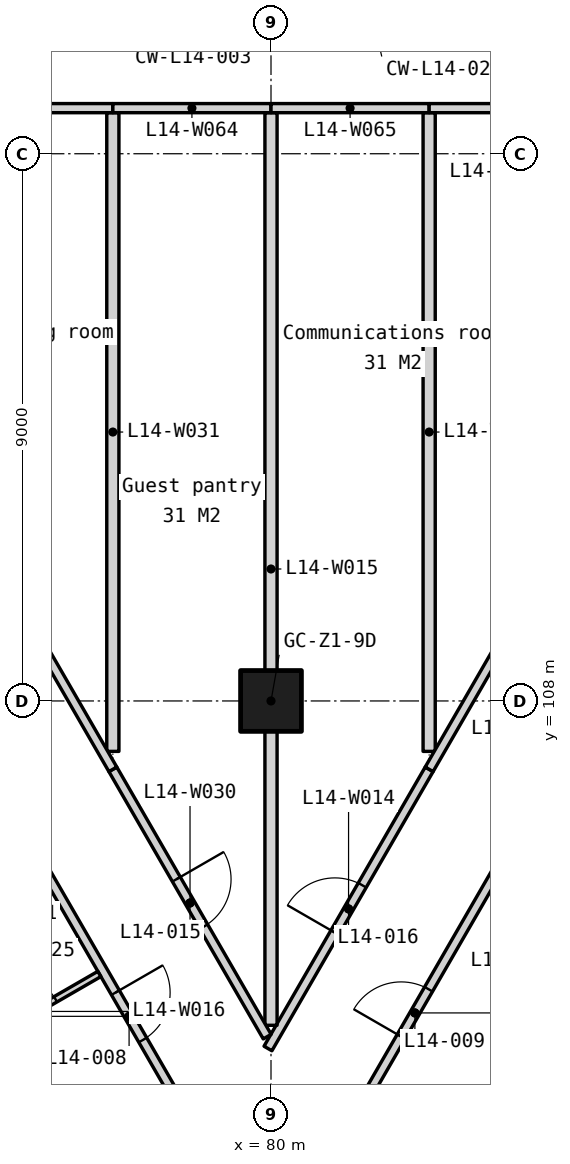
"""IFC4 building model, lengths in metres.
Left out: names, types, materials, properties, quantities, classifications, styles, units other than length and angle.
Written with IfcOpenShell. Run it as: python <this file> out.ifc"""

import sys

from ifc_helpers import new_model, si_unit, direction, frame, frame_2d, origin, origin_2d, place, context, subcontext, project, spatial, polyline, rectangle, outline, extrude, element, fill, save


model = new_model("IFC4")
c1 = context("Model", 3, precision=1e-05, world=origin(), true_north=direction((0.0, 1.0)))
c2 = subcontext(c1, "Body", "Model", "MODEL_VIEW")
j1 = project(units=[si_unit("LENGTHUNIT", "METRE"), si_unit("PLANEANGLEUNIT", "RADIAN")], contexts=[c1])
p1 = place(None, origin())
s1 = spatial("IfcSite", under=j1, at=p1, CompositionType="ELEMENT")
p2 = place(p1, origin())
s2 = spatial("IfcBuilding", under=s1, at=p2, CompositionType="ELEMENT")
p3 = place(p2, frame((0.0, 0.0, 63.0)))
s3 = spatial("IfcBuildingStorey", under=s2, at=p3, CompositionType="ELEMENT", Elevation=63.0)
p4 = place(p3, frame((80.0, 108.0, 0.0), z_axis=(0.0, 0.0, 1.0), x_axis=(1.0, 0.0, 0.0)))
e1 = element("IfcColumn", 1, at=p4, inside=s3, PredefinedType="COLUMN", context=c2, shape_type="SweptSolid", body=[
    extrude(rectangle(XDim=1.0, YDim=1.0, at=origin_2d()), origin(), (0.0, 0.0, 1.0), 3.5),
])
p5 = place(p3, frame((54.495, 129.397, -0.15), z_axis=(0.0, 0.0, 1.0), x_axis=(0.499999201451, -0.866025864826, 0.0)))
e2 = element("IfcWall", 2, at=p5, inside=s3, PredefinedType="SOLIDWALL", context=c2, shape_type="SweptSolid", body=[
    extrude(outline(polyline([(44.8, 0.0), (44.8, 3.5), (0.0, 3.5), (0.0, 0.0), (44.8, 0.0)])), frame((0.0, 0.225, 0.0), z_axis=(0.0, -1.0, 0.0), x_axis=(1.0, 0.0, 0.0)), (0.0, 0.0, 1.0), 0.45),
])
p6 = place(p5, frame((2.43, 0.0, 1.05)))
e3 = element("IfcOpeningElement", 3, at=p6, cuts=e2, PredefinedType="OPENING", context=c2, shape_type="SweptSolid", body=[
    extrude(rectangle(XDim=1.8, YDim=1.5, at=frame_2d((0.9, 0.75))), frame((0.0, 0.235, 0.0), z_axis=(0.0, -1.0, 0.0), x_axis=(1.0, 0.0, 0.0)), (0.0, 0.0, 1.0), 0.47),
])
p7 = place(p5, frame((4.73, 0.0, 1.05)))
e4 = element("IfcOpeningElement", 4, at=p7, cuts=e2, PredefinedType="OPENING", context=c2, shape_type="SweptSolid", body=[
    extrude(rectangle(XDim=1.8, YDim=1.5, at=frame_2d((0.9, 0.75))), frame((0.0, 0.235, 0.0), z_axis=(0.0, -1.0, 0.0), x_axis=(1.0, 0.0, 0.0)), (0.0, 0.0, 1.0), 0.47),
])
p8 = place(p5, frame((11.39, 0.0, 1.05)))
e5 = element("IfcOpeningElement", 5, at=p8, cuts=e2, PredefinedType="OPENING", context=c2, shape_type="SweptSolid", body=[
    extrude(rectangle(XDim=1.8, YDim=1.5, at=frame_2d((0.9, 0.75))), frame((0.0, 0.235, 0.0), z_axis=(0.0, -1.0, 0.0), x_axis=(1.0, 0.0, 0.0)), (0.0, 0.0, 1.0), 0.47),
])
p9 = place(p5, frame((13.69, 0.0, 1.05)))
e6 = element("IfcOpeningElement", 6, at=p9, cuts=e2, PredefinedType="OPENING", context=c2, shape_type="SweptSolid", body=[
    extrude(rectangle(XDim=1.8, YDim=1.5, at=frame_2d((0.9, 0.75))), frame((0.0, 0.235, 0.0), z_axis=(0.0, -1.0, 0.0), x_axis=(1.0, 0.0, 0.0)), (0.0, 0.0, 1.0), 0.47),
])
p10 = place(p5, frame((20.35, 0.0, 1.05)))
e7 = element("IfcOpeningElement", 7, at=p10, cuts=e2, PredefinedType="OPENING", context=c2, shape_type="SweptSolid", body=[
    extrude(rectangle(XDim=1.8, YDim=1.5, at=frame_2d((0.9, 0.75))), frame((0.0, 0.235, 0.0), z_axis=(0.0, -1.0, 0.0), x_axis=(1.0, 0.0, 0.0)), (0.0, 0.0, 1.0), 0.47),
])
p11 = place(p5, frame((22.65, 0.0, 1.05)))
e8 = element("IfcOpeningElement", 8, at=p11, cuts=e2, PredefinedType="OPENING", context=c2, shape_type="SweptSolid", body=[
    extrude(rectangle(XDim=1.8, YDim=1.5, at=frame_2d((0.9, 0.75))), frame((0.0, 0.235, 0.0), z_axis=(0.0, -1.0, 0.0), x_axis=(1.0, 0.0, 0.0)), (0.0, 0.0, 1.0), 0.47),
])
p12 = place(p5, frame((29.31, 0.0, 1.05)))
e9 = element("IfcOpeningElement", 9, at=p12, cuts=e2, PredefinedType="OPENING", context=c2, shape_type="SweptSolid", body=[
    extrude(rectangle(XDim=1.8, YDim=1.5, at=frame_2d((0.9, 0.75))), frame((0.0, 0.235, 0.0), z_axis=(0.0, -1.0, 0.0), x_axis=(1.0, 0.0, 0.0)), (0.0, 0.0, 1.0), 0.47),
])
p13 = place(p5, frame((31.61, 0.0, 1.05)))
e10 = element("IfcOpeningElement", 10, at=p13, cuts=e2, PredefinedType="OPENING", context=c2, shape_type="SweptSolid", body=[
    extrude(rectangle(XDim=1.8, YDim=1.5, at=frame_2d((0.9, 0.75))), frame((0.0, 0.235, 0.0), z_axis=(0.0, -1.0, 0.0), x_axis=(1.0, 0.0, 0.0)), (0.0, 0.0, 1.0), 0.47),
])
p14 = place(p5, frame((38.27, 0.0, 1.05)))
e11 = element("IfcOpeningElement", 11, at=p14, cuts=e2, PredefinedType="OPENING", context=c2, shape_type="SweptSolid", body=[
    extrude(rectangle(XDim=1.8, YDim=1.5, at=frame_2d((0.9, 0.75))), frame((0.0, 0.235, 0.0), z_axis=(0.0, -1.0, 0.0), x_axis=(1.0, 0.0, 0.0)), (0.0, 0.0, 1.0), 0.47),
])
p15 = place(p5, frame((40.57, 0.0, 1.05)))
e12 = element("IfcOpeningElement", 12, at=p15, cuts=e2, PredefinedType="OPENING", context=c2, shape_type="SweptSolid", body=[
    extrude(rectangle(XDim=1.8, YDim=1.5, at=frame_2d((0.9, 0.75))), frame((0.0, 0.235, 0.0), z_axis=(0.0, -1.0, 0.0), x_axis=(1.0, 0.0, 0.0)), (0.0, 0.0, 1.0), 0.47),
])
p16 = place(p3, frame((83.105, 90.599, -0.15), z_axis=(0.0, 0.0, 1.0), x_axis=(0.499999201451, 0.866025864826, 0.0)))
e13 = element("IfcWall", 13, at=p16, inside=s3, PredefinedType="SOLIDWALL", context=c2, shape_type="SweptSolid", body=[
    extrude(outline(polyline([(44.8, 0.0), (44.8, 3.5), (0.0, 3.5), (0.0, 0.0), (44.8, 0.0)])), frame((0.0, 0.225, 0.0), z_axis=(0.0, -1.0, 0.0), x_axis=(1.0, 0.0, 0.0)), (0.0, 0.0, 1.0), 0.45),
])
p17 = place(p16, frame((2.43, 0.0, 1.05)))
e14 = element("IfcOpeningElement", 14, at=p17, cuts=e13, PredefinedType="OPENING", context=c2, shape_type="SweptSolid", body=[
    extrude(rectangle(XDim=1.8, YDim=1.5, at=frame_2d((0.9, 0.75))), frame((0.0, 0.235, 0.0), z_axis=(0.0, -1.0, 0.0), x_axis=(1.0, 0.0, 0.0)), (0.0, 0.0, 1.0), 0.47),
])
p18 = place(p16, frame((4.73, 0.0, 1.05)))
e15 = element("IfcOpeningElement", 15, at=p18, cuts=e13, PredefinedType="OPENING", context=c2, shape_type="SweptSolid", body=[
    extrude(rectangle(XDim=1.8, YDim=1.5, at=frame_2d((0.9, 0.75))), frame((0.0, 0.235, 0.0), z_axis=(0.0, -1.0, 0.0), x_axis=(1.0, 0.0, 0.0)), (0.0, 0.0, 1.0), 0.47),
])
p19 = place(p16, frame((11.39, 0.0, 1.05)))
e16 = element("IfcOpeningElement", 16, at=p19, cuts=e13, PredefinedType="OPENING", context=c2, shape_type="SweptSolid", body=[
    extrude(rectangle(XDim=1.8, YDim=1.5, at=frame_2d((0.9, 0.75))), frame((0.0, 0.235, 0.0), z_axis=(0.0, -1.0, 0.0), x_axis=(1.0, 0.0, 0.0)), (0.0, 0.0, 1.0), 0.47),
])
p20 = place(p16, frame((13.69, 0.0, 1.05)))
e17 = element("IfcOpeningElement", 17, at=p20, cuts=e13, PredefinedType="OPENING", context=c2, shape_type="SweptSolid", body=[
    extrude(rectangle(XDim=1.8, YDim=1.5, at=frame_2d((0.9, 0.75))), frame((0.0, 0.235, 0.0), z_axis=(0.0, -1.0, 0.0), x_axis=(1.0, 0.0, 0.0)), (0.0, 0.0, 1.0), 0.47),
])
p21 = place(p16, frame((20.35, 0.0, 1.05)))
e18 = element("IfcOpeningElement", 18, at=p21, cuts=e13, PredefinedType="OPENING", context=c2, shape_type="SweptSolid", body=[
    extrude(rectangle(XDim=1.8, YDim=1.5, at=frame_2d((0.9, 0.75))), frame((0.0, 0.235, 0.0), z_axis=(0.0, -1.0, 0.0), x_axis=(1.0, 0.0, 0.0)), (0.0, 0.0, 1.0), 0.47),
])
p22 = place(p16, frame((22.65, 0.0, 1.05)))
e19 = element("IfcOpeningElement", 19, at=p22, cuts=e13, PredefinedType="OPENING", context=c2, shape_type="SweptSolid", body=[
    extrude(rectangle(XDim=1.8, YDim=1.5, at=frame_2d((0.9, 0.75))), frame((0.0, 0.235, 0.0), z_axis=(0.0, -1.0, 0.0), x_axis=(1.0, 0.0, 0.0)), (0.0, 0.0, 1.0), 0.47),
])
p23 = place(p16, frame((29.31, 0.0, 1.05)))
e20 = element("IfcOpeningElement", 20, at=p23, cuts=e13, PredefinedType="OPENING", context=c2, shape_type="SweptSolid", body=[
    extrude(rectangle(XDim=1.8, YDim=1.5, at=frame_2d((0.9, 0.75))), frame((0.0, 0.235, 0.0), z_axis=(0.0, -1.0, 0.0), x_axis=(1.0, 0.0, 0.0)), (0.0, 0.0, 1.0), 0.47),
])
p24 = place(p16, frame((31.61, 0.0, 1.05)))
e21 = element("IfcOpeningElement", 21, at=p24, cuts=e13, PredefinedType="OPENING", context=c2, shape_type="SweptSolid", body=[
    extrude(rectangle(XDim=1.8, YDim=1.5, at=frame_2d((0.9, 0.75))), frame((0.0, 0.235, 0.0), z_axis=(0.0, -1.0, 0.0), x_axis=(1.0, 0.0, 0.0)), (0.0, 0.0, 1.0), 0.47),
])
p25 = place(p16, frame((38.27, 0.0, 1.05)))
e22 = element("IfcOpeningElement", 22, at=p25, cuts=e13, PredefinedType="OPENING", context=c2, shape_type="SweptSolid", body=[
    extrude(rectangle(XDim=1.8, YDim=1.5, at=frame_2d((0.9, 0.75))), frame((0.0, 0.235, 0.0), z_axis=(0.0, -1.0, 0.0), x_axis=(1.0, 0.0, 0.0)), (0.0, 0.0, 1.0), 0.47),
])
p26 = place(p16, frame((40.57, 0.0, 1.05)))
e23 = element("IfcOpeningElement", 23, at=p26, cuts=e13, PredefinedType="OPENING", context=c2, shape_type="SweptSolid", body=[
    extrude(rectangle(XDim=1.8, YDim=1.5, at=frame_2d((0.9, 0.75))), frame((0.0, 0.235, 0.0), z_axis=(0.0, -1.0, 0.0), x_axis=(1.0, 0.0, 0.0)), (0.0, 0.0, 1.0), 0.47),
])
p27 = place(p3, frame((76.042, 105.626, 0.0), z_axis=(0.0, 0.0, 1.0), x_axis=(0.499991405182, -0.866030365948, 0.0)))
e24 = element("IfcWall", 24, at=p27, inside=s3, PredefinedType="PARTITIONING", context=c2, shape_type="SweptSolid", body=[
    extrude(rectangle(XDim=6.496, YDim=0.15, at=frame_2d((3.248, 0.0))), origin(), (0.0, 0.0, 1.0), 3.35),
])
p28 = place(p27, frame((2.798, 0.0, 0.0)))
e25 = element("IfcOpeningElement", 25, at=p28, cuts=e24, PredefinedType="OPENING", context=c2, shape_type="SweptSolid", body=[
    extrude(rectangle(XDim=0.9, YDim=2.1, at=frame_2d((0.45, 1.05))), frame((0.0, 0.085, 0.0), z_axis=(0.0, -1.0, 0.0), x_axis=(1.0, 0.0, 0.0)), (0.0, 0.0, 1.0), 0.17),
])
p29 = place(p3, frame((79.95, 102.284, 0.0), z_axis=(0.0, 0.0, 1.0), x_axis=(0.500026712466, 0.866009980786, 0.0)))
e26 = element("IfcWall", 26, at=p29, inside=s3, PredefinedType="PARTITIONING", context=c2, shape_type="SweptSolid", body=[
    extrude(rectangle(XDim=5.302, YDim=0.15, at=frame_2d((2.651, 0.0))), origin(), (0.0, 0.0, 1.0), 3.35),
])
p30 = place(p29, frame((2.201, 0.0, 0.0)))
e27 = element("IfcOpeningElement", 27, at=p30, cuts=e26, PredefinedType="OPENING", context=c2, shape_type="SweptSolid", body=[
    extrude(rectangle(XDim=0.9, YDim=2.1, at=frame_2d((0.45, 1.05))), frame((0.0, 0.085, 0.0), z_axis=(0.0, -1.0, 0.0), x_axis=(1.0, 0.0, 0.0)), (0.0, 0.0, 1.0), 0.17),
])
p31 = place(p3, frame((80.0, 102.666, 0.0), z_axis=(0.0, 0.0, 1.0), x_axis=(0.0, 1.0, 0.0)))
e28 = element("IfcWall", 28, at=p31, inside=s3, PredefinedType="PARTITIONING", context=c2, shape_type="SweptSolid", body=[
    extrude(rectangle(XDim=15.01, YDim=0.2, at=frame_2d((7.505, 0.0))), origin(), (0.0, 0.0, 1.0), 2.801),
])
p32 = place(p3, frame((75.042, 102.277, 0.0), z_axis=(0.0, 0.0, 1.0), x_axis=(0.865997559407, 0.500048224776, 0.0)))
e29 = element("IfcWall", 29, at=p32, inside=s3, PredefinedType="PARTITIONING", context=c2, shape_type="SweptSolid", body=[
    extrude(rectangle(XDim=2.465, YDim=0.1, at=frame_2d((1.232, 0.0))), origin(), (0.0, 0.0, 1.0), 3.35),
])
p33 = place(p32, frame((0.833, 0.0, 0.0)))
e30 = element("IfcOpeningElement", 30, at=p33, cuts=e29, PredefinedType="OPENING", context=c2, shape_type="SweptSolid", body=[
    extrude(rectangle(XDim=0.8, YDim=2.1, at=frame_2d((0.4, 1.05))), frame((0.0, 0.06, 0.0), z_axis=(0.0, -1.0, 0.0), x_axis=(1.0, 0.0, 0.0)), (0.0, 0.0, 1.0), 0.12),
])
p34 = place(p3, frame((80.775, 100.113, 0.0), z_axis=(0.0, 0.0, 1.0), x_axis=(0.5000079448, 0.866020816803, 0.0)))
e31 = element("IfcWall", 31, at=p34, inside=s3, PredefinedType="PARTITIONING", context=c2, shape_type="SweptSolid", body=[
    extrude(rectangle(XDim=6.366, YDim=0.15, at=frame_2d((3.183, 0.0))), origin(), (0.0, 0.0, 1.0), 3.35),
])
p35 = place(p34, frame((2.733, 0.0, 0.0)))
e32 = element("IfcOpeningElement", 32, at=p35, cuts=e31, PredefinedType="OPENING", context=c2, shape_type="SweptSolid", body=[
    extrude(rectangle(XDim=0.9, YDim=2.1, at=frame_2d((0.45, 1.05))), frame((0.0, 0.085, 0.0), z_axis=(0.0, -1.0, 0.0), x_axis=(1.0, 0.0, 0.0)), (0.0, 0.0, 1.0), 0.17),
])
p36 = place(p3, frame((77.399, 106.875, 0.0), z_axis=(0.0, 0.0, 1.0), x_axis=(0.500017996867, -0.866015013039, 0.0)))
e33 = element("IfcWall", 33, at=p36, inside=s3, PredefinedType="PARTITIONING", context=c2, shape_type="SweptSolid", body=[
    extrude(rectangle(XDim=5.077, YDim=0.15, at=frame_2d((2.539, 0.0))), origin(), (0.0, 0.0, 1.0), 3.35),
])
p37 = place(p36, frame((2.088, 0.0, 0.0)))
e34 = element("IfcOpeningElement", 34, at=p37, cuts=e33, PredefinedType="OPENING", context=c2, shape_type="SweptSolid", body=[
    extrude(rectangle(XDim=0.9, YDim=2.1, at=frame_2d((0.45, 1.05))), frame((0.0, 0.085, 0.0), z_axis=(0.0, -1.0, 0.0), x_axis=(1.0, 0.0, 0.0)), (0.0, 0.0, 1.0), 0.17),
])
for number, where, z_axis, x_axis in (
    (35, (77.399, 107.171, 0.0), (0.0, 0.0, 1.0), (0.0, 1.0, 0.0)),
    (36, (82.601, 107.171, 0.0), (0.0, 0.0, 1.0), (0.0, 1.0, 0.0)),
):
    element("IfcWall", number, at=place(p3, frame(where, z_axis=z_axis, x_axis=x_axis)), inside=s3, PredefinedType="PARTITIONING", context=c2, shape_type="SweptSolid", body=[
        extrude(rectangle(XDim=10.504, YDim=0.2, at=frame_2d((5.252, 0.0))), origin(), (0.0, 0.0, 1.0), 3.35),
    ])
p38 = place(p3, frame((82.601, 106.875, 0.0), z_axis=(0.0, 0.0, 1.0), x_axis=(0.499995104884, 0.866028229963, 0.0)))
e37 = element("IfcWall", 37, at=p38, inside=s3, PredefinedType="PARTITIONING", context=c2, shape_type="SweptSolid", body=[
    extrude(rectangle(XDim=12.557, YDim=0.15, at=frame_2d((6.278, 0.0))), origin(), (0.0, 0.0, 1.0), 3.35),
])
p39 = place(p38, frame((5.828, 0.0, 0.0)))
e38 = element("IfcOpeningElement", 38, at=p39, cuts=e37, PredefinedType="OPENING", context=c2, shape_type="SweptSolid", body=[
    extrude(rectangle(XDim=0.9, YDim=2.1, at=frame_2d((0.45, 1.05))), frame((0.0, 0.085, 0.0), z_axis=(0.0, -1.0, 0.0), x_axis=(1.0, 0.0, 0.0)), (0.0, 0.0, 1.0), 0.17),
])
p40 = place(p3, frame((71.121, 117.75, 0.0), z_axis=(0.0, 0.0, 1.0), x_axis=(0.499995104884, -0.866028229963, 0.0)))
e39 = element("IfcWall", 39, at=p40, inside=s3, PredefinedType="PARTITIONING", context=c2, shape_type="SweptSolid", body=[
    extrude(rectangle(XDim=12.557, YDim=0.15, at=frame_2d((6.278, 0.0))), origin(), (0.0, 0.0, 1.0), 3.35),
])
p41 = place(p40, frame((5.828, 0.0, 0.0)))
e40 = element("IfcOpeningElement", 40, at=p41, cuts=e39, PredefinedType="OPENING", context=c2, shape_type="SweptSolid", body=[
    extrude(rectangle(XDim=0.9, YDim=2.1, at=frame_2d((0.45, 1.05))), frame((0.0, 0.085, 0.0), z_axis=(0.0, -1.0, 0.0), x_axis=(1.0, 0.0, 0.0)), (0.0, 0.0, 1.0), 0.17),
])
p42 = place(p3, frame((71.25, 117.75, 0.0), z_axis=(0.0, 0.0, 1.0), x_axis=(1.0, 0.0, 0.0)))
e41 = element("IfcWall", 41, at=p42, inside=s3, PredefinedType="PARTITIONING", context=c2, shape_type="SweptSolid", body=[
    extrude(rectangle(XDim=6.148, YDim=0.15, at=frame_2d((3.074, 0.0))), origin(), (0.0, 0.0, 1.0), 3.35),
])
for number, where, z_axis, x_axis in (
    (42, (77.399, 117.75, 0.0), (0.0, 0.0, 1.0), (1.0, 0.0, 0.0)),
    (43, (80.0, 117.75, 0.0), (0.0, 0.0, 1.0), (1.0, 0.0, 0.0)),
):
    element("IfcWall", number, at=place(p3, frame(where, z_axis=z_axis, x_axis=x_axis)), inside=s3, PredefinedType="PARTITIONING", context=c2, shape_type="SweptSolid", body=[
        extrude(rectangle(XDim=2.601, YDim=0.15, at=frame_2d((1.301, 0.0))), origin(), (0.0, 0.0, 1.0), 3.35),
    ])
p43 = place(p3, frame((82.601, 117.75, 0.0), z_axis=(0.0, 0.0, 1.0), x_axis=(1.0, 0.0, 0.0)))
e44 = element("IfcWall", 44, at=p43, inside=s3, PredefinedType="PARTITIONING", context=c2, shape_type="SweptSolid", body=[
    extrude(rectangle(XDim=6.148, YDim=0.15, at=frame_2d((3.074, 0.0))), origin(), (0.0, 0.0, 1.0), 3.35),
])
p44 = place(p28, origin())
e45 = element("IfcDoor", 45, at=p44, inside=s3, OperationType="SINGLE_SWING_LEFT", PredefinedType="DOOR", context=c2, shape_type="SweptSolid", body=[
    extrude(rectangle(XDim=0.9, YDim=2.1, at=frame_2d((0.45, 1.05))), frame((0.0, 0.025, 0.0), z_axis=(0.0, -1.0, 0.0), x_axis=(1.0, 0.0, 0.0)), (0.0, 0.0, 1.0), 0.05),
])
fill(e25, e45)
p45 = place(p35, origin())
e46 = element("IfcDoor", 46, at=p45, inside=s3, OperationType="SINGLE_SWING_LEFT", PredefinedType="DOOR", context=c2, shape_type="SweptSolid", body=[
    extrude(rectangle(XDim=0.9, YDim=2.1, at=frame_2d((0.45, 1.05))), frame((0.0, 0.025, 0.0), z_axis=(0.0, -1.0, 0.0), x_axis=(1.0, 0.0, 0.0)), (0.0, 0.0, 1.0), 0.05),
])
fill(e32, e46)
p46 = place(p37, origin())
e47 = element("IfcDoor", 47, at=p46, inside=s3, OperationType="SINGLE_SWING_LEFT", PredefinedType="DOOR", context=c2, shape_type="SweptSolid", body=[
    extrude(rectangle(XDim=0.9, YDim=2.1, at=frame_2d((0.45, 1.05))), frame((0.0, 0.025, 0.0), z_axis=(0.0, -1.0, 0.0), x_axis=(1.0, 0.0, 0.0)), (0.0, 0.0, 1.0), 0.05),
])
fill(e34, e47)
p47 = place(p30, origin())
e48 = element("IfcDoor", 48, at=p47, inside=s3, OperationType="SINGLE_SWING_LEFT", PredefinedType="DOOR", context=c2, shape_type="SweptSolid", body=[
    extrude(rectangle(XDim=0.9, YDim=2.1, at=frame_2d((0.45, 1.05))), frame((0.0, 0.025, 0.0), z_axis=(0.0, -1.0, 0.0), x_axis=(1.0, 0.0, 0.0)), (0.0, 0.0, 1.0), 0.05),
])
fill(e27, e48)
p48 = place(p33, origin())
e49 = element("IfcDoor", 49, at=p48, inside=s3, OperationType="SINGLE_SWING_LEFT", PredefinedType="DOOR", context=c2, shape_type="SweptSolid", body=[
    extrude(rectangle(XDim=0.8, YDim=2.1, at=frame_2d((0.4, 1.05))), frame((0.0, 0.025, 0.0), z_axis=(0.0, -1.0, 0.0), x_axis=(1.0, 0.0, 0.0)), (0.0, 0.0, 1.0), 0.05),
])
fill(e30, e49)
save(model, sys.argv[1])
